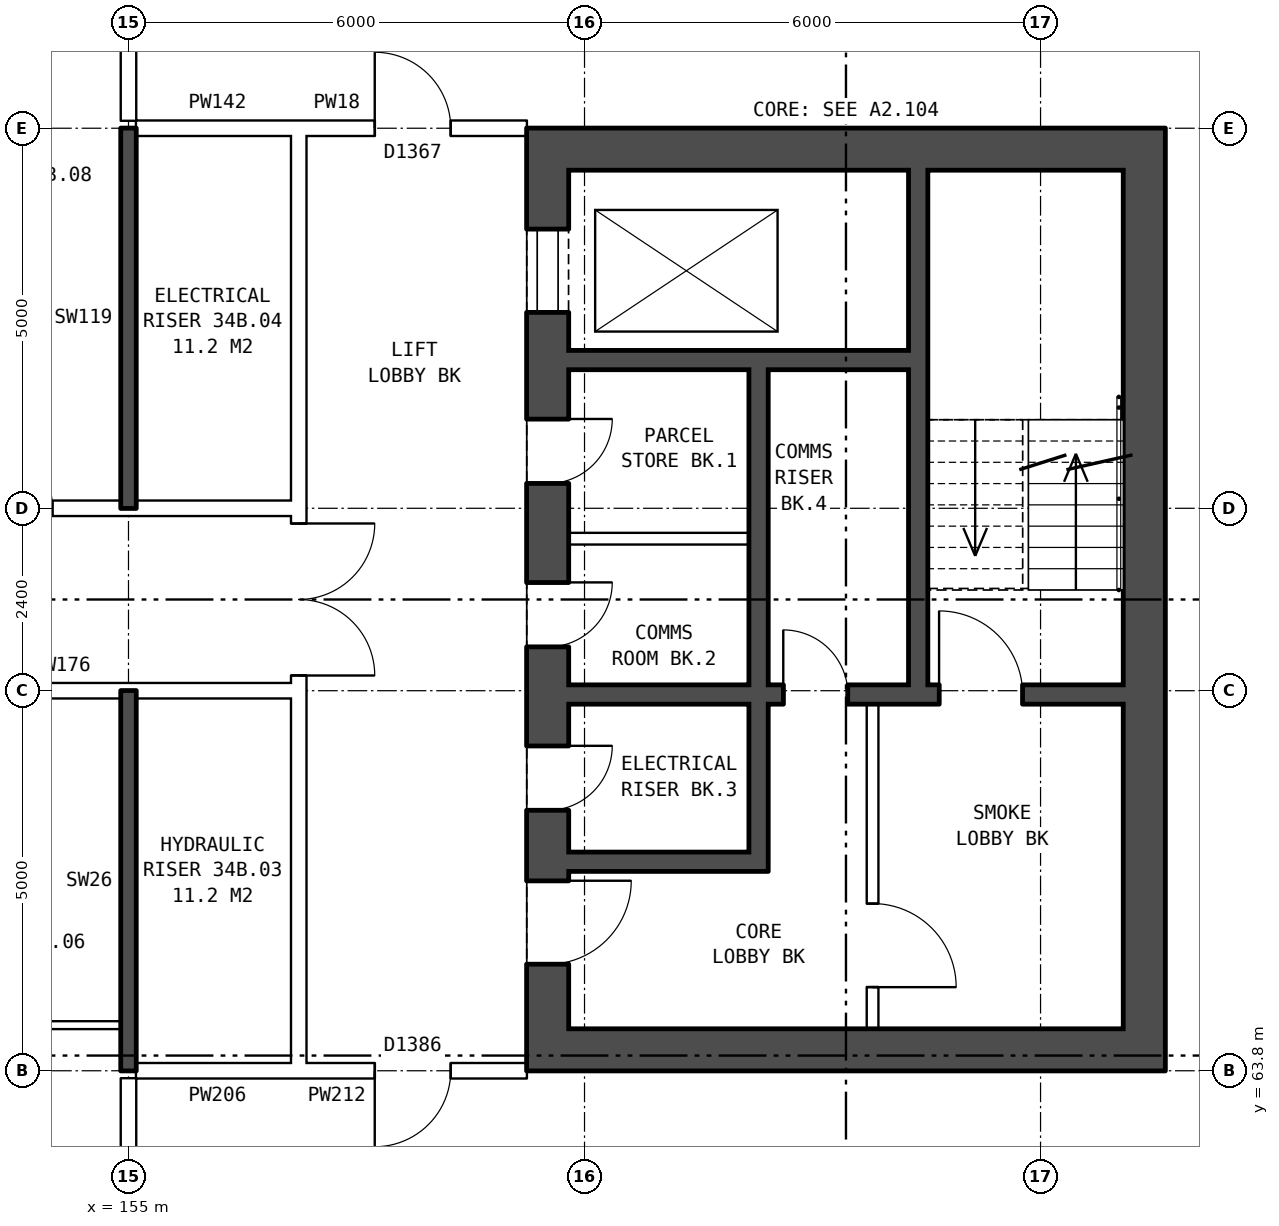
"""IFC4 building model, lengths in metres.
Left out: names, types, materials, properties, quantities, classifications, styles, units other than length and angle.
Written with IfcOpenShell. Run it as: python <this file> out.ifc"""

import sys

from ifc_helpers import new_model, si_unit, direction, frame, frame_2d, origin, place, context, subcontext, project, spatial, rectangle, extrude, element, fill, save


model = new_model("IFC4")
c1 = context("Model", 3, precision=1e-05, world=origin(), true_north=direction((0.0, 1.0)))
c2 = subcontext(c1, "Body", "Model", "MODEL_VIEW")
j1 = project(units=[si_unit("LENGTHUNIT", "METRE"), si_unit("PLANEANGLEUNIT", "RADIAN")], contexts=[c1])
p1 = place(None, origin())
s1 = spatial("IfcSite", under=j1, at=p1, CompositionType="ELEMENT")
p2 = place(p1, origin())
s2 = spatial("IfcBuilding", under=s1, at=p2, CompositionType="ELEMENT")
p3 = place(p2, frame((0.0, 0.0, 123.7)))
s3 = spatial("IfcBuildingStorey", under=s2, at=p3, CompositionType="ELEMENT", Elevation=123.7)
p4 = place(p3, frame((160.515, 76.2, 0.0), z_axis=(0.0, 0.0, 1.0), x_axis=(0.0, -1.0, 0.0)))
e1 = element("IfcWall", 1, at=p4, inside=s3, PredefinedType="SHEAR", context=c2, shape_type="SweptSolid", body=[
    extrude(rectangle(XDim=12.4, YDim=0.55, at=frame_2d((6.2, 0.0))), origin(), (0.0, 0.0, 1.0), 2.85),
])
p5 = place(p4, frame((1.325, 0.0, 0.0)))
e2 = element("IfcOpeningElement", 2, at=p5, cuts=e1, PredefinedType="OPENING", context=c2, shape_type="SweptSolid", body=[
    extrude(rectangle(XDim=1.1, YDim=2.1, at=frame_2d((0.55, 1.05))), frame((0.0, 0.285, 0.0), z_axis=(0.0, -1.0, 0.0), x_axis=(1.0, 0.0, 0.0)), (0.0, 0.0, 1.0), 0.57),
])
p6 = place(p4, frame((3.825, 0.0, 0.0)))
e3 = element("IfcOpeningElement", 3, at=p6, cuts=e1, PredefinedType="OPENING", context=c2, shape_type="SweptSolid", body=[
    extrude(rectangle(XDim=0.85, YDim=2.1, at=frame_2d((0.425, 1.05))), frame((0.0, 0.285, 0.0), z_axis=(0.0, -1.0, 0.0), x_axis=(1.0, 0.0, 0.0)), (0.0, 0.0, 1.0), 0.57),
])
p7 = place(p4, frame((5.975, 0.0, 0.0)))
e4 = element("IfcOpeningElement", 4, at=p7, cuts=e1, PredefinedType="OPENING", context=c2, shape_type="SweptSolid", body=[
    extrude(rectangle(XDim=0.85, YDim=2.1, at=frame_2d((0.425, 1.05))), frame((0.0, 0.285, 0.0), z_axis=(0.0, -1.0, 0.0), x_axis=(1.0, 0.0, 0.0)), (0.0, 0.0, 1.0), 0.57),
])
p8 = place(p4, frame((9.9, 0.0, 0.0)))
e5 = element("IfcOpeningElement", 5, at=p8, cuts=e1, PredefinedType="OPENING", context=c2, shape_type="SweptSolid", body=[
    extrude(rectangle(XDim=1.1, YDim=2.1, at=frame_2d((0.55, 1.05))), frame((0.0, 0.285, 0.0), z_axis=(0.0, -1.0, 0.0), x_axis=(1.0, 0.0, 0.0)), (0.0, 0.0, 1.0), 0.57),
])
p9 = place(p4, frame((8.125, 0.0, 0.0)))
e6 = element("IfcOpeningElement", 6, at=p9, cuts=e1, PredefinedType="OPENING", context=c2, shape_type="SweptSolid", body=[
    extrude(rectangle(XDim=0.85, YDim=2.1, at=frame_2d((0.425, 1.05))), frame((0.0, 0.285, 0.0), z_axis=(0.0, -1.0, 0.0), x_axis=(1.0, 0.0, 0.0)), (0.0, 0.0, 1.0), 0.57),
])
p10 = place(p3, frame((168.365, 76.2, 0.0), z_axis=(0.0, 0.0, 1.0), x_axis=(0.0, -1.0, 0.0)))
e7 = element("IfcWall", 7, at=p10, inside=s3, PredefinedType="SHEAR", context=c2, shape_type="SweptSolid", body=[
    extrude(rectangle(XDim=12.4, YDim=0.55, at=frame_2d((6.2, 0.0))), origin(), (0.0, 0.0, 1.0), 2.85),
])
for number, where, z_axis, x_axis in (
    (8, (160.79, 75.925, 0.0), (0.0, 0.0, 1.0), (1.0, 0.0, 0.0)),
    (9, (160.79, 64.075, 0.0), (0.0, 0.0, 1.0), (1.0, 0.0, 0.0)),
):
    element("IfcWall", number, at=place(p3, frame(where, z_axis=z_axis, x_axis=x_axis)), inside=s3, PredefinedType="SHEAR", context=c2, shape_type="SweptSolid", body=[
        extrude(rectangle(XDim=7.3, YDim=0.55, at=frame_2d((3.65, 0.0))), origin(), (0.0, 0.0, 1.0), 2.85),
    ])
p11 = place(p3, frame((160.79, 73.15, 0.0), z_axis=(0.0, 0.0, 1.0), x_axis=(1.0, 0.0, 0.0)))
e10 = element("IfcWall", 10, at=p11, inside=s3, PredefinedType="SHEAR", context=c2, shape_type="SweptSolid", body=[
    extrude(rectangle(XDim=4.475, YDim=0.25, at=frame_2d((2.237, 0.0))), origin(), (0.0, 0.0, 1.0), 2.85),
])
p12 = place(p3, frame((160.79, 70.8, 0.0), z_axis=(0.0, 0.0, 1.0), x_axis=(1.0, 0.0, 0.0)))
e11 = element("IfcWall", 11, at=p12, inside=s3, PredefinedType="PARTITIONING", context=c2, shape_type="SweptSolid", body=[
    extrude(rectangle(XDim=2.375, YDim=0.15, at=frame_2d((1.188, 0.0))), origin(), (0.0, 0.0, 1.0), 2.85),
])
p13 = place(p3, frame((160.79, 68.75, 0.0), z_axis=(0.0, 0.0, 1.0), x_axis=(1.0, 0.0, 0.0)))
e12 = element("IfcWall", 12, at=p13, inside=s3, PredefinedType="SHEAR", context=c2, shape_type="SweptSolid", body=[
    extrude(rectangle(XDim=7.3, YDim=0.25, at=frame_2d((3.65, 0.0))), origin(), (0.0, 0.0, 1.0), 2.85),
])
p14 = place(p13, frame((4.875, 0.0, 0.0)))
e13 = element("IfcOpeningElement", 13, at=p14, cuts=e12, PredefinedType="OPENING", context=c2, shape_type="SweptSolid", body=[
    extrude(rectangle(XDim=1.1, YDim=2.1, at=frame_2d((0.55, 1.05))), frame((0.0, 0.135, 0.0), z_axis=(0.0, -1.0, 0.0), x_axis=(1.0, 0.0, 0.0)), (0.0, 0.0, 1.0), 0.27),
])
p15 = place(p13, frame((2.825, 0.0, 0.0)))
e14 = element("IfcOpeningElement", 14, at=p15, cuts=e12, PredefinedType="OPENING", context=c2, shape_type="SweptSolid", body=[
    extrude(rectangle(XDim=0.85, YDim=2.1, at=frame_2d((0.425, 1.05))), frame((0.0, 0.135, 0.0), z_axis=(0.0, -1.0, 0.0), x_axis=(1.0, 0.0, 0.0)), (0.0, 0.0, 1.0), 0.27),
])
p16 = place(p3, frame((160.79, 66.55, 0.0), z_axis=(0.0, 0.0, 1.0), x_axis=(1.0, 0.0, 0.0)))
e15 = element("IfcWall", 15, at=p16, inside=s3, PredefinedType="SHEAR", context=c2, shape_type="SweptSolid", body=[
    extrude(rectangle(XDim=2.375, YDim=0.25, at=frame_2d((1.188, 0.0))), origin(), (0.0, 0.0, 1.0), 2.85),
])
p17 = place(p3, frame((163.29, 73.025, 0.0), z_axis=(0.0, 0.0, 1.0), x_axis=(0.0, -1.0, 0.0)))
e16 = element("IfcWall", 16, at=p17, inside=s3, PredefinedType="SHEAR", context=c2, shape_type="SweptSolid", body=[
    extrude(rectangle(XDim=4.15, YDim=0.25, at=frame_2d((2.075, 0.0))), origin(), (0.0, 0.0, 1.0), 2.85),
])
p18 = place(p3, frame((163.29, 68.625, 0.0), z_axis=(0.0, 0.0, 1.0), x_axis=(0.0, -1.0, 0.0)))
e17 = element("IfcWall", 17, at=p18, inside=s3, PredefinedType="SHEAR", context=c2, shape_type="SweptSolid", body=[
    extrude(rectangle(XDim=2.2, YDim=0.25, at=frame_2d((1.1, 0.0))), origin(), (0.0, 0.0, 1.0), 2.85),
])
p19 = place(p3, frame((164.79, 68.625, 0.0), z_axis=(0.0, 0.0, 1.0), x_axis=(0.0, -1.0, 0.0)))
e18 = element("IfcWall", 18, at=p19, inside=s3, PredefinedType="PARTITIONING", context=c2, shape_type="SweptSolid", body=[
    extrude(rectangle(XDim=4.275, YDim=0.15, at=frame_2d((2.137, 0.0))), origin(), (0.0, 0.0, 1.0), 2.85),
])
p20 = place(p19, frame((2.625, 0.0, 0.0)))
e19 = element("IfcOpeningElement", 19, at=p20, cuts=e18, PredefinedType="OPENING", context=c2, shape_type="SweptSolid", body=[
    extrude(rectangle(XDim=1.1, YDim=2.1, at=frame_2d((0.55, 1.05))), frame((0.0, 0.085, 0.0), z_axis=(0.0, -1.0, 0.0), x_axis=(1.0, 0.0, 0.0)), (0.0, 0.0, 1.0), 0.17),
])
p21 = place(p3, frame((165.39, 75.65, 0.0), z_axis=(0.0, 0.0, 1.0), x_axis=(0.0, -1.0, 0.0)))
e20 = element("IfcWall", 20, at=p21, inside=s3, PredefinedType="SHEAR", context=c2, shape_type="SweptSolid", body=[
    extrude(rectangle(XDim=6.775, YDim=0.25, at=frame_2d((3.387, 0.0))), origin(), (0.0, 0.0, 1.0), 2.85),
])
p22 = place(p3, frame((157.24, 63.9, 0.0), z_axis=(0.0, 0.0, 1.0), x_axis=(0.0, 1.0, 0.0)))
e21 = element("IfcWall", 21, at=p22, inside=s3, PredefinedType="PARTITIONING", context=c2, shape_type="SweptSolid", body=[
    extrude(rectangle(XDim=12.2, YDim=0.2, at=frame_2d((6.1, 0.0))), origin(), (0.0, 0.0, 1.0), 2.85),
])
p23 = place(p22, frame((5.1, 0.0, 0.0)))
e22 = element("IfcOpeningElement", 22, at=p23, cuts=e21, PredefinedType="OPENING", context=c2, shape_type="SweptSolid", body=[
    extrude(rectangle(XDim=2.0, YDim=2.1, at=frame_2d((1.0, 1.05))), frame((0.0, 0.11, 0.0), z_axis=(0.0, -1.0, 0.0), x_axis=(1.0, 0.0, 0.0)), (0.0, 0.0, 1.0), 0.22),
])
p24 = place(p3, frame((155.1, 63.8, 0.0), z_axis=(0.0, 0.0, 1.0), x_axis=(1.0, 0.0, 0.0)))
e23 = element("IfcWall", 23, at=p24, inside=s3, PredefinedType="PARTITIONING", context=c2, shape_type="SweptSolid", body=[
    extrude(rectangle(XDim=2.14, YDim=0.2, at=frame_2d((1.07, 0.0))), origin(), (0.0, 0.0, 1.0), 2.85),
])
p25 = place(p3, frame((157.24, 63.8, 0.0), z_axis=(0.0, 0.0, 1.0), x_axis=(1.0, 0.0, 0.0)))
e24 = element("IfcWall", 24, at=p25, inside=s3, PredefinedType="PARTITIONING", context=c2, shape_type="SweptSolid", body=[
    extrude(rectangle(XDim=3.0, YDim=0.2, at=frame_2d((1.5, 0.0))), origin(), (0.0, 0.0, 1.0), 2.85),
])
p26 = place(p25, frame((1.0, 0.0, 0.0)))
e25 = element("IfcOpeningElement", 25, at=p26, cuts=e24, PredefinedType="OPENING", context=c2, shape_type="SweptSolid", body=[
    extrude(rectangle(XDim=1.0, YDim=2.1, at=frame_2d((0.5, 1.05))), frame((0.0, 0.11, 0.0), z_axis=(0.0, -1.0, 0.0), x_axis=(1.0, 0.0, 0.0)), (0.0, 0.0, 1.0), 0.22),
])
p27 = place(p3, frame((152.0, 64.4, 0.0), z_axis=(0.0, 0.0, 1.0), x_axis=(1.0, 0.0, 0.0)))
e26 = element("IfcWall", 26, at=p27, inside=s3, PredefinedType="PARTITIONING", context=c2, shape_type="SweptSolid", body=[
    extrude(rectangle(XDim=2.9, YDim=0.1, at=frame_2d((1.45, 0.0))), origin(), (0.0, 0.0, 1.0), 2.85),
])
p28 = place(p3, frame((142.76, 68.8, 0.0), z_axis=(0.0, 0.0, 1.0), x_axis=(1.0, 0.0, 0.0)))
e27 = element("IfcWall", 27, at=p28, inside=s3, PredefinedType="PARTITIONING", context=c2, shape_type="SweptSolid", body=[
    extrude(rectangle(XDim=14.48, YDim=0.2, at=frame_2d((7.24, 0.0))), origin(), (0.0, 0.0, 1.0), 2.85),
])
p29 = place(p28, frame((1.12, 0.0, 0.0)))
e28 = element("IfcOpeningElement", 28, at=p29, cuts=e27, PredefinedType="OPENING", context=c2, shape_type="SweptSolid", body=[
    extrude(rectangle(XDim=1.0, YDim=2.1, at=frame_2d((0.5, 1.05))), frame((0.0, 0.11, 0.0), z_axis=(0.0, -1.0, 0.0), x_axis=(1.0, 0.0, 0.0)), (0.0, 0.0, 1.0), 0.22),
])
p30 = place(p28, frame((7.24, 0.0, 0.0)))
e29 = element("IfcOpeningElement", 29, at=p30, cuts=e27, PredefinedType="OPENING", context=c2, shape_type="SweptSolid", body=[
    extrude(rectangle(XDim=1.0, YDim=2.1, at=frame_2d((0.5, 1.05))), frame((0.0, 0.11, 0.0), z_axis=(0.0, -1.0, 0.0), x_axis=(1.0, 0.0, 0.0)), (0.0, 0.0, 1.0), 0.22),
])
p31 = place(p3, frame((142.76, 71.2, 0.0), z_axis=(0.0, 0.0, 1.0), x_axis=(1.0, 0.0, 0.0)))
e30 = element("IfcWall", 30, at=p31, inside=s3, PredefinedType="PARTITIONING", context=c2, shape_type="SweptSolid", body=[
    extrude(rectangle(XDim=14.48, YDim=0.2, at=frame_2d((7.24, 0.0))), origin(), (0.0, 0.0, 1.0), 2.85),
])
p32 = place(p31, frame((1.12, 0.0, 0.0)))
e31 = element("IfcOpeningElement", 31, at=p32, cuts=e30, PredefinedType="OPENING", context=c2, shape_type="SweptSolid", body=[
    extrude(rectangle(XDim=1.0, YDim=2.1, at=frame_2d((0.5, 1.05))), frame((0.0, 0.11, 0.0), z_axis=(0.0, -1.0, 0.0), x_axis=(1.0, 0.0, 0.0)), (0.0, 0.0, 1.0), 0.22),
])
p33 = place(p31, frame((10.24, 0.0, 0.0)))
e32 = element("IfcOpeningElement", 32, at=p33, cuts=e30, PredefinedType="OPENING", context=c2, shape_type="SweptSolid", body=[
    extrude(rectangle(XDim=1.0, YDim=2.1, at=frame_2d((0.5, 1.05))), frame((0.0, 0.11, 0.0), z_axis=(0.0, -1.0, 0.0), x_axis=(1.0, 0.0, 0.0)), (0.0, 0.0, 1.0), 0.22),
])
p34 = place(p3, frame((155.1, 76.2, 0.0), z_axis=(0.0, 0.0, 1.0), x_axis=(1.0, 0.0, 0.0)))
e33 = element("IfcWall", 33, at=p34, inside=s3, PredefinedType="PARTITIONING", context=c2, shape_type="SweptSolid", body=[
    extrude(rectangle(XDim=2.14, YDim=0.2, at=frame_2d((1.07, 0.0))), origin(), (0.0, 0.0, 1.0), 2.85),
])
p35 = place(p3, frame((157.24, 76.2, 0.0), z_axis=(0.0, 0.0, 1.0), x_axis=(1.0, 0.0, 0.0)))
e34 = element("IfcWall", 34, at=p35, inside=s3, PredefinedType="PARTITIONING", context=c2, shape_type="SweptSolid", body=[
    extrude(rectangle(XDim=3.0, YDim=0.2, at=frame_2d((1.5, 0.0))), origin(), (0.0, 0.0, 1.0), 2.85),
])
p36 = place(p35, frame((1.0, 0.0, 0.0)))
e35 = element("IfcOpeningElement", 35, at=p36, cuts=e34, PredefinedType="OPENING", context=c2, shape_type="SweptSolid", body=[
    extrude(rectangle(XDim=1.0, YDim=2.1, at=frame_2d((0.5, 1.05))), frame((0.0, 0.11, 0.0), z_axis=(0.0, -1.0, 0.0), x_axis=(1.0, 0.0, 0.0)), (0.0, 0.0, 1.0), 0.22),
])
p37 = place(p3, frame((155.0, 61.5, 0.0), z_axis=(0.0, 0.0, 1.0), x_axis=(0.0, 1.0, 0.0)))
e36 = element("IfcWall", 36, at=p37, inside=s3, PredefinedType="PARTITIONING", context=c2, shape_type="SweptSolid", body=[
    extrude(rectangle(XDim=2.2, YDim=0.2, at=frame_2d((1.1, 0.0))), origin(), (0.0, 0.0, 1.0), 2.85),
])
for number, where, z_axis, x_axis in (
    (37, (155.0, 63.8, 0.0), (0.0, 0.0, 1.0), (0.0, 1.0, 0.0)),
    (38, (155.0, 71.2, 0.0), (0.0, 0.0, 1.0), (0.0, 1.0, 0.0)),
):
    element("IfcWall", number, at=place(p3, frame(where, z_axis=z_axis, x_axis=x_axis)), inside=s3, PredefinedType="SOLIDWALL", context=c2, shape_type="SweptSolid", body=[
        extrude(rectangle(XDim=5.0, YDim=0.2, at=frame_2d((2.5, 0.0))), origin(), (0.0, 0.0, 1.0), 2.85),
    ])
p38 = place(p3, frame((155.0, 76.3, 0.0), z_axis=(0.0, 0.0, 1.0), x_axis=(0.0, 1.0, 0.0)))
e39 = element("IfcWall", 39, at=p38, inside=s3, PredefinedType="PARTITIONING", context=c2, shape_type="SweptSolid", body=[
    extrude(rectangle(XDim=2.2, YDim=0.2, at=frame_2d((1.1, 0.0))), origin(), (0.0, 0.0, 1.0), 2.85),
])
p39 = place(p5, origin())
e40 = element("IfcDoor", 40, at=p39, inside=s3, OperationType="DOUBLE_DOOR_SLIDING", PredefinedType="DOOR", context=c2, shape_type="SweptSolid", body=[
    extrude(rectangle(XDim=1.1, YDim=2.1, at=frame_2d((0.55, 1.05))), frame((0.0, 0.26, 0.0), z_axis=(0.0, -1.0, 0.0), x_axis=(1.0, 0.0, 0.0)), (0.0, 0.0, 1.0), 0.05),
])
fill(e2, e40)
p40 = place(p6, origin())
e41 = element("IfcDoor", 41, at=p40, inside=s3, OperationType="SINGLE_SWING_LEFT", PredefinedType="DOOR", context=c2, shape_type="SweptSolid", body=[
    extrude(rectangle(XDim=0.85, YDim=2.1, at=frame_2d((0.425, 1.05))), frame((0.0, 0.26, 0.0), z_axis=(0.0, -1.0, 0.0), x_axis=(1.0, 0.0, 0.0)), (0.0, 0.0, 1.0), 0.05),
])
fill(e3, e41)
p41 = place(p7, origin())
e42 = element("IfcDoor", 42, at=p41, inside=s3, OperationType="SINGLE_SWING_LEFT", PredefinedType="DOOR", context=c2, shape_type="SweptSolid", body=[
    extrude(rectangle(XDim=0.85, YDim=2.1, at=frame_2d((0.425, 1.05))), frame((0.0, 0.26, 0.0), z_axis=(0.0, -1.0, 0.0), x_axis=(1.0, 0.0, 0.0)), (0.0, 0.0, 1.0), 0.05),
])
fill(e4, e42)
p42 = place(p8, origin())
e43 = element("IfcDoor", 43, at=p42, inside=s3, OperationType="SINGLE_SWING_LEFT", PredefinedType="DOOR", context=c2, shape_type="SweptSolid", body=[
    extrude(rectangle(XDim=1.1, YDim=2.1, at=frame_2d((0.55, 1.05))), frame((0.0, 0.26, 0.0), z_axis=(0.0, -1.0, 0.0), x_axis=(1.0, 0.0, 0.0)), (0.0, 0.0, 1.0), 0.05),
])
fill(e5, e43)
p43 = place(p20, origin())
e44 = element("IfcDoor", 44, at=p43, inside=s3, OperationType="SINGLE_SWING_RIGHT", PredefinedType="DOOR", context=c2, shape_type="SweptSolid", body=[
    extrude(rectangle(XDim=1.1, YDim=2.1, at=frame_2d((0.55, 1.05))), frame((0.0, 0.025, 0.0), z_axis=(0.0, -1.0, 0.0), x_axis=(1.0, 0.0, 0.0)), (0.0, 0.0, 1.0), 0.05),
])
fill(e19, e44)
p44 = place(p14, origin())
e45 = element("IfcDoor", 45, at=p44, inside=s3, OperationType="SINGLE_SWING_LEFT", PredefinedType="DOOR", context=c2, shape_type="SweptSolid", body=[
    extrude(rectangle(XDim=1.1, YDim=2.1, at=frame_2d((0.55, 1.05))), frame((0.0, 0.025, 0.0), z_axis=(0.0, -1.0, 0.0), x_axis=(1.0, 0.0, 0.0)), (0.0, 0.0, 1.0), 0.05),
])
fill(e13, e45)
p45 = place(p9, origin())
e46 = element("IfcDoor", 46, at=p45, inside=s3, OperationType="SINGLE_SWING_LEFT", PredefinedType="DOOR", context=c2, shape_type="SweptSolid", body=[
    extrude(rectangle(XDim=0.85, YDim=2.1, at=frame_2d((0.425, 1.05))), frame((0.0, 0.26, 0.0), z_axis=(0.0, -1.0, 0.0), x_axis=(1.0, 0.0, 0.0)), (0.0, 0.0, 1.0), 0.05),
])
fill(e6, e46)
p46 = place(p15, origin())
e47 = element("IfcDoor", 47, at=p46, inside=s3, OperationType="SINGLE_SWING_LEFT", PredefinedType="DOOR", context=c2, shape_type="SweptSolid", body=[
    extrude(rectangle(XDim=0.85, YDim=2.1, at=frame_2d((0.425, 1.05))), frame((0.0, 0.025, 0.0), z_axis=(0.0, -1.0, 0.0), x_axis=(1.0, 0.0, 0.0)), (0.0, 0.0, 1.0), 0.05),
])
fill(e14, e47)
p47 = place(p23, frame((2.0, 0.0, 0.0), z_axis=(0.0, 0.0, 1.0), x_axis=(-1.0, 0.0, 0.0)))
e48 = element("IfcDoor", 48, at=p47, inside=s3, OperationType="DOUBLE_DOOR_SINGLE_SWING", PredefinedType="DOOR", context=c2, shape_type="SweptSolid", body=[
    extrude(rectangle(XDim=2.0, YDim=2.1, at=frame_2d((1.0, 1.05))), frame((0.0, 0.025, 0.0), z_axis=(0.0, -1.0, 0.0), x_axis=(1.0, 0.0, 0.0)), (0.0, 0.0, 1.0), 0.05),
])
fill(e22, e48)
p48 = place(p26, frame((1.0, 0.0, 0.0), z_axis=(0.0, 0.0, 1.0), x_axis=(-1.0, 0.0, 0.0)))
e49 = element("IfcDoor", 49, at=p48, inside=s3, OperationType="SINGLE_SWING_RIGHT", PredefinedType="DOOR", context=c2, shape_type="SweptSolid", body=[
    extrude(rectangle(XDim=1.0, YDim=2.1, at=frame_2d((0.5, 1.05))), frame((0.0, 0.025, 0.0), z_axis=(0.0, -1.0, 0.0), x_axis=(1.0, 0.0, 0.0)), (0.0, 0.0, 1.0), 0.05),
])
fill(e25, e49)
p49 = place(p36, origin())
e50 = element("IfcDoor", 50, at=p49, inside=s3, OperationType="SINGLE_SWING_LEFT", PredefinedType="DOOR", context=c2, shape_type="SweptSolid", body=[
    extrude(rectangle(XDim=1.0, YDim=2.1, at=frame_2d((0.5, 1.05))), frame((0.0, 0.025, 0.0), z_axis=(0.0, -1.0, 0.0), x_axis=(1.0, 0.0, 0.0)), (0.0, 0.0, 1.0), 0.05),
])
fill(e35, e50)
save(model, sys.argv[1])
